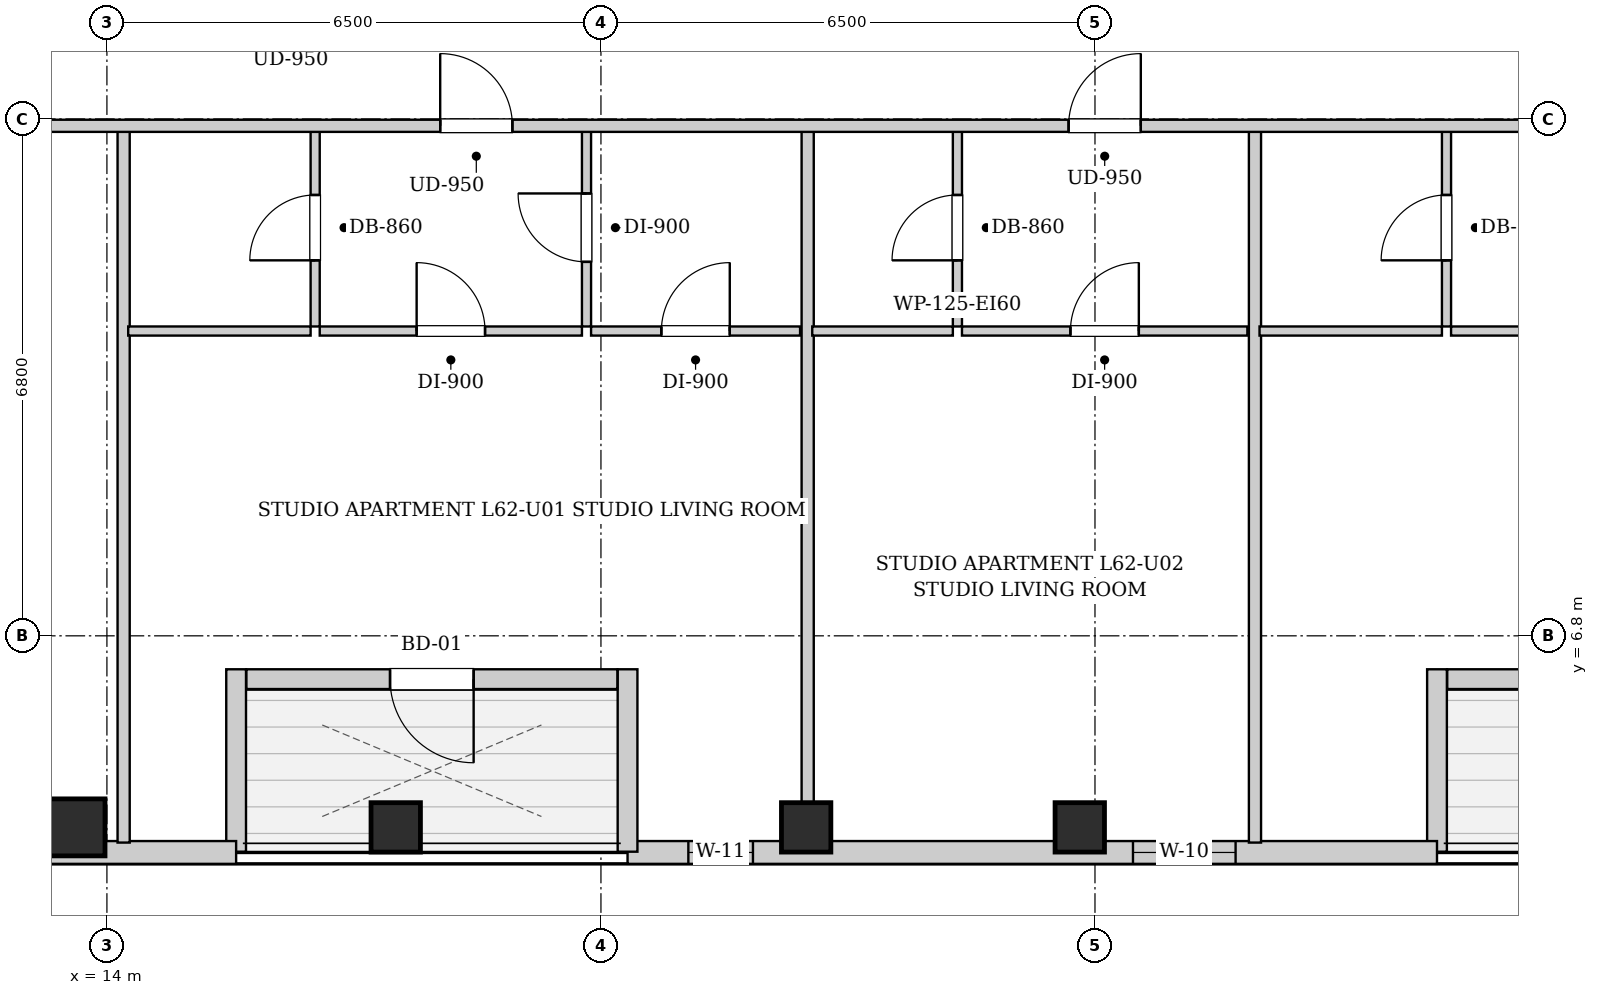
"""IFC4 building model, lengths in metres.
Left out: names, types, materials, properties, quantities, classifications, styles, units other than length and angle.
Written with IfcOpenShell. Run it as: python <this file> out.ifc"""

import sys

from ifc_helpers import new_model, si_unit, direction, frame, frame_2d, origin, origin_2d, place, context, subcontext, project, spatial, rectangle, extrude, element, fill, save


model = new_model("IFC4")
c1 = context("Model", 3, precision=1e-05, world=origin(), true_north=direction((0.0, 1.0)))
c2 = subcontext(c1, "Body", "Model", "MODEL_VIEW")
j1 = project(units=[si_unit("LENGTHUNIT", "METRE"), si_unit("PLANEANGLEUNIT", "RADIAN")], contexts=[c1])
p1 = place(None, origin())
s1 = spatial("IfcSite", under=j1, at=p1, CompositionType="ELEMENT")
p2 = place(p1, origin())
s2 = spatial("IfcBuilding", under=s1, at=p2, CompositionType="ELEMENT")
p3 = place(p2, frame((0.0, 0.0, 214.0)))
s3 = spatial("IfcBuildingStorey", under=s2, at=p3, CompositionType="ELEMENT", Elevation=214.0)
p4 = place(p3, frame((13.6, 4.28, 0.0), z_axis=(0.0, 0.0, 1.0), x_axis=(1.0, 0.0, 0.0)))
e1 = element("IfcColumn", 1, at=p4, inside=s3, PredefinedType="COLUMN", context=c2, shape_type="SweptSolid", body=[
    extrude(rectangle(XDim=0.75, YDim=0.75, at=origin_2d()), origin(), (0.0, 0.0, 1.0), 3.3),
])
for number, where, z_axis, x_axis in (
    (2, (17.8, 4.28, 0.0), (0.0, 0.0, 1.0), (1.0, 0.0, 0.0)),
    (3, (23.2, 4.28, 0.0), (0.0, 0.0, 1.0), (1.0, 0.0, 0.0)),
    (4, (26.8, 4.28, 0.0), (0.0, 0.0, 1.0), (1.0, 0.0, 0.0)),
):
    element("IfcColumn", number, at=place(p3, frame(where, z_axis=z_axis, x_axis=x_axis)), inside=s3, PredefinedType="COLUMN", context=c2, shape_type="SweptSolid", body=[
        extrude(rectangle(XDim=0.65, YDim=0.65, at=origin_2d()), origin(), (0.0, 0.0, 1.0), 3.3),
    ])
p5 = place(p3, frame((36.366, 6.23, 0.0), z_axis=(0.0, 0.0, 1.0), x_axis=(-1.0, 0.0, 0.0)))
e5 = element("IfcWall", 5, at=p5, inside=s3, PredefinedType="SOLIDWALL", context=c2, shape_type="SweptSolid", body=[
    extrude(rectangle(XDim=4.732, YDim=0.26, at=frame_2d((2.366, 0.0))), origin(), (0.0, 0.0, 1.0), 3.04),
])
p6 = place(p5, frame((1.816, 0.0, 0.0)))
e6 = element("IfcOpeningElement", 6, at=p6, cuts=e5, PredefinedType="OPENING", context=c2, shape_type="SweptSolid", body=[
    extrude(rectangle(XDim=1.1, YDim=2.0, at=frame_2d((0.55, 1.0))), frame((0.0, 0.14, 0.0), z_axis=(0.0, -1.0, 0.0), x_axis=(1.0, 0.0, 0.0)), (0.0, 0.0, 1.0), 0.28),
])
p7 = place(p3, frame((31.5, 6.36, 0.0), z_axis=(0.0, 0.0, 1.0), x_axis=(0.0, -1.0, 0.0)))
e7 = element("IfcWall", 7, at=p7, inside=s3, PredefinedType="SOLIDWALL", context=c2, shape_type="SweptSolid", body=[
    extrude(rectangle(XDim=2.4, YDim=0.26, at=frame_2d((1.2, 0.0))), origin(), (0.0, 0.0, 1.0), 3.04),
])
p8 = place(p3, frame((31.5, 3.95, 0.0), z_axis=(0.0, 0.0, 1.0), x_axis=(-1.0, 0.0, 0.0)))
e8 = element("IfcWall", 8, at=p8, inside=s3, PredefinedType="SOLIDWALL", context=c2, shape_type="SweptSolid", body=[
    extrude(rectangle(XDim=10.65, YDim=0.3, at=frame_2d((5.325, 0.0))), origin(), (0.0, 0.0, 1.0), 3.04),
])
p9 = place(p8, frame((9.0, 0.0, 0.55)))
e9 = element("IfcOpeningElement", 9, at=p9, cuts=e8, PredefinedType="OPENING", context=c2, shape_type="SweptSolid", body=[
    extrude(rectangle(XDim=0.85, YDim=1.2, at=frame_2d((0.425, 0.6))), frame((0.0, 0.16, 0.0), z_axis=(0.0, -1.0, 0.0), x_axis=(1.0, 0.0, 0.0)), (0.0, 0.0, 1.0), 0.32),
])
p10 = place(p8, frame((2.65, 0.0, 0.55)))
e10 = element("IfcOpeningElement", 10, at=p10, cuts=e8, PredefinedType="OPENING", context=c2, shape_type="SweptSolid", body=[
    extrude(rectangle(XDim=1.35, YDim=1.2, at=frame_2d((0.675, 0.6))), frame((0.0, 0.16, 0.0), z_axis=(0.0, -1.0, 0.0), x_axis=(1.0, 0.0, 0.0)), (0.0, 0.0, 1.0), 0.32),
])
p11 = place(p3, frame((20.85, 3.96, 0.0), z_axis=(0.0, 0.0, 1.0), x_axis=(0.0, 1.0, 0.0)))
e11 = element("IfcWall", 11, at=p11, inside=s3, PredefinedType="SOLIDWALL", context=c2, shape_type="SweptSolid", body=[
    extrude(rectangle(XDim=2.4, YDim=0.26, at=frame_2d((1.2, 0.0))), origin(), (0.0, 0.0, 1.0), 3.04),
])
p12 = place(p3, frame((20.716, 6.23, 0.0), z_axis=(0.0, 0.0, 1.0), x_axis=(-1.0, 0.0, 0.0)))
e12 = element("IfcWall", 12, at=p12, inside=s3, PredefinedType="SOLIDWALL", context=c2, shape_type="SweptSolid", body=[
    extrude(rectangle(XDim=4.882, YDim=0.26, at=frame_2d((2.441, 0.0))), origin(), (0.0, 0.0, 1.0), 3.04),
])
p13 = place(p12, frame((1.891, 0.0, 0.0)))
e13 = element("IfcOpeningElement", 13, at=p13, cuts=e12, PredefinedType="OPENING", context=c2, shape_type="SweptSolid", body=[
    extrude(rectangle(XDim=1.1, YDim=2.0, at=frame_2d((0.55, 1.0))), frame((0.0, 0.14, 0.0), z_axis=(0.0, -1.0, 0.0), x_axis=(1.0, 0.0, 0.0)), (0.0, 0.0, 1.0), 0.28),
])
p14 = place(p3, frame((15.7, 6.36, 0.0), z_axis=(0.0, 0.0, 1.0), x_axis=(0.0, -1.0, 0.0)))
e14 = element("IfcWall", 14, at=p14, inside=s3, PredefinedType="SOLIDWALL", context=c2, shape_type="SweptSolid", body=[
    extrude(rectangle(XDim=2.4, YDim=0.26, at=frame_2d((1.2, 0.0))), origin(), (0.0, 0.0, 1.0), 3.04),
])
p15 = place(p3, frame((15.7, 3.95, 0.0), z_axis=(0.0, 0.0, 1.0), x_axis=(-1.0, 0.0, 0.0)))
e15 = element("IfcWall", 15, at=p15, inside=s3, PredefinedType="SOLIDWALL", context=c2, shape_type="SweptSolid", body=[
    extrude(rectangle(XDim=2.6, YDim=0.3, at=frame_2d((1.3, 0.0))), origin(), (0.0, 0.0, 1.0), 3.04),
])
p16 = place(p3, frame((14.22, 4.08, 0.0), z_axis=(0.0, 0.0, 1.0), x_axis=(0.0, 1.0, 0.0)))
e16 = element("IfcWall", 16, at=p16, inside=s3, PredefinedType="PARTITIONING", context=c2, shape_type="SweptSolid", body=[
    extrude(rectangle(XDim=9.39, YDim=0.16, at=frame_2d((4.695, 0.0))), origin(), (0.0, 0.0, 1.0), 3.04),
])
p17 = place(p3, frame((16.74, 10.87, 0.0), z_axis=(0.0, 0.0, 1.0), x_axis=(0.0, 1.0, 0.0)))
e17 = element("IfcWall", 17, at=p17, inside=s3, PredefinedType="PARTITIONING", context=c2, shape_type="SweptSolid", body=[
    extrude(rectangle(XDim=2.6, YDim=0.12, at=frame_2d((1.3, 0.0))), origin(), (0.0, 0.0, 1.0), 3.04),
])
p18 = place(p17, frame((0.87, 0.0, 0.0)))
e18 = element("IfcOpeningElement", 18, at=p18, cuts=e17, PredefinedType="OPENING", context=c2, shape_type="SweptSolid", body=[
    extrude(rectangle(XDim=0.86, YDim=2.05, at=frame_2d((0.43, 1.025))), frame((0.0, 0.07, 0.0), z_axis=(0.0, -1.0, 0.0), x_axis=(1.0, 0.0, 0.0)), (0.0, 0.0, 1.0), 0.14),
])
p19 = place(p3, frame((14.28, 10.81, 0.0), z_axis=(0.0, 0.0, 1.0), x_axis=(1.0, 0.0, 0.0)))
e19 = element("IfcWall", 19, at=p19, inside=s3, PredefinedType="PARTITIONING", context=c2, shape_type="SweptSolid", body=[
    extrude(rectangle(XDim=2.4, YDim=0.12, at=frame_2d((1.2, 0.0))), origin(), (0.0, 0.0, 1.0), 3.04),
])
p20 = place(p3, frame((20.31, 10.87, 0.0), z_axis=(0.0, 0.0, 1.0), x_axis=(0.0, 1.0, 0.0)))
e20 = element("IfcWall", 20, at=p20, inside=s3, PredefinedType="PARTITIONING", context=c2, shape_type="SweptSolid", body=[
    extrude(rectangle(XDim=2.6, YDim=0.12, at=frame_2d((1.3, 0.0))), origin(), (0.0, 0.0, 1.0), 3.04),
])
p21 = place(p20, frame((0.85, 0.0, 0.0)))
e21 = element("IfcOpeningElement", 21, at=p21, cuts=e20, PredefinedType="OPENING", context=c2, shape_type="SweptSolid", body=[
    extrude(rectangle(XDim=0.9, YDim=2.05, at=frame_2d((0.45, 1.025))), frame((0.0, 0.07, 0.0), z_axis=(0.0, -1.0, 0.0), x_axis=(1.0, 0.0, 0.0)), (0.0, 0.0, 1.0), 0.14),
])
p22 = place(p3, frame((16.8, 10.81, 0.0), z_axis=(0.0, 0.0, 1.0), x_axis=(1.0, 0.0, 0.0)))
e22 = element("IfcWall", 22, at=p22, inside=s3, PredefinedType="PARTITIONING", context=c2, shape_type="SweptSolid", body=[
    extrude(rectangle(XDim=3.45, YDim=0.12, at=frame_2d((1.725, 0.0))), origin(), (0.0, 0.0, 1.0), 3.04),
])
p23 = place(p22, frame((1.275, 0.0, 0.0)))
e23 = element("IfcOpeningElement", 23, at=p23, cuts=e22, PredefinedType="OPENING", context=c2, shape_type="SweptSolid", body=[
    extrude(rectangle(XDim=0.9, YDim=2.05, at=frame_2d((0.45, 1.025))), frame((0.0, 0.07, 0.0), z_axis=(0.0, -1.0, 0.0), x_axis=(1.0, 0.0, 0.0)), (0.0, 0.0, 1.0), 0.14),
])
p24 = place(p3, frame((20.37, 10.81, 0.0), z_axis=(0.0, 0.0, 1.0), x_axis=(1.0, 0.0, 0.0)))
e24 = element("IfcWall", 24, at=p24, inside=s3, PredefinedType="PARTITIONING", context=c2, shape_type="SweptSolid", body=[
    extrude(rectangle(XDim=2.75, YDim=0.12, at=frame_2d((1.375, 0.0))), origin(), (0.0, 0.0, 1.0), 3.04),
])
p25 = place(p24, frame((0.925, 0.0, 0.0)))
e25 = element("IfcOpeningElement", 25, at=p25, cuts=e24, PredefinedType="OPENING", context=c2, shape_type="SweptSolid", body=[
    extrude(rectangle(XDim=0.9, YDim=2.05, at=frame_2d((0.45, 1.025))), frame((0.0, 0.07, 0.0), z_axis=(0.0, -1.0, 0.0), x_axis=(1.0, 0.0, 0.0)), (0.0, 0.0, 1.0), 0.14),
])
p26 = place(p3, frame((23.22, 4.08, 0.0), z_axis=(0.0, 0.0, 1.0), x_axis=(0.0, 1.0, 0.0)))
e26 = element("IfcWall", 26, at=p26, inside=s3, PredefinedType="PARTITIONING", context=c2, shape_type="SweptSolid", body=[
    extrude(rectangle(XDim=9.39, YDim=0.16, at=frame_2d((4.695, 0.0))), origin(), (0.0, 0.0, 1.0), 3.04),
])
p27 = place(p3, frame((25.19, 10.87, 0.0), z_axis=(0.0, 0.0, 1.0), x_axis=(0.0, 1.0, 0.0)))
e27 = element("IfcWall", 27, at=p27, inside=s3, PredefinedType="PARTITIONING", context=c2, shape_type="SweptSolid", body=[
    extrude(rectangle(XDim=2.6, YDim=0.12, at=frame_2d((1.3, 0.0))), origin(), (0.0, 0.0, 1.0), 3.04),
])
p28 = place(p27, frame((0.87, 0.0, 0.0)))
e28 = element("IfcOpeningElement", 28, at=p28, cuts=e27, PredefinedType="OPENING", context=c2, shape_type="SweptSolid", body=[
    extrude(rectangle(XDim=0.86, YDim=2.05, at=frame_2d((0.43, 1.025))), frame((0.0, 0.07, 0.0), z_axis=(0.0, -1.0, 0.0), x_axis=(1.0, 0.0, 0.0)), (0.0, 0.0, 1.0), 0.14),
])
p29 = place(p3, frame((23.28, 10.81, 0.0), z_axis=(0.0, 0.0, 1.0), x_axis=(1.0, 0.0, 0.0)))
e29 = element("IfcWall", 29, at=p29, inside=s3, PredefinedType="PARTITIONING", context=c2, shape_type="SweptSolid", body=[
    extrude(rectangle(XDim=1.85, YDim=0.12, at=frame_2d((0.925, 0.0))), origin(), (0.0, 0.0, 1.0), 3.04),
])
p30 = place(p3, frame((25.25, 10.81, 0.0), z_axis=(0.0, 0.0, 1.0), x_axis=(1.0, 0.0, 0.0)))
e30 = element("IfcWall", 30, at=p30, inside=s3, PredefinedType="PARTITIONING", context=c2, shape_type="SweptSolid", body=[
    extrude(rectangle(XDim=3.755, YDim=0.12, at=frame_2d((1.877, 0.0))), origin(), (0.0, 0.0, 1.0), 3.04),
])
p31 = place(p30, frame((1.427, 0.0, 0.0)))
e31 = element("IfcOpeningElement", 31, at=p31, cuts=e30, PredefinedType="OPENING", context=c2, shape_type="SweptSolid", body=[
    extrude(rectangle(XDim=0.9, YDim=2.05, at=frame_2d((0.45, 1.025))), frame((0.0, 0.07, 0.0), z_axis=(0.0, -1.0, 0.0), x_axis=(1.0, 0.0, 0.0)), (0.0, 0.0, 1.0), 0.14),
])
p32 = place(p3, frame((29.105, 4.08, 0.0), z_axis=(0.0, 0.0, 1.0), x_axis=(0.0, 1.0, 0.0)))
e32 = element("IfcWall", 32, at=p32, inside=s3, PredefinedType="PARTITIONING", context=c2, shape_type="SweptSolid", body=[
    extrude(rectangle(XDim=9.39, YDim=0.16, at=frame_2d((4.695, 0.0))), origin(), (0.0, 0.0, 1.0), 3.04),
])
p33 = place(p3, frame((31.625, 10.87, 0.0), z_axis=(0.0, 0.0, 1.0), x_axis=(0.0, 1.0, 0.0)))
e33 = element("IfcWall", 33, at=p33, inside=s3, PredefinedType="PARTITIONING", context=c2, shape_type="SweptSolid", body=[
    extrude(rectangle(XDim=2.6, YDim=0.12, at=frame_2d((1.3, 0.0))), origin(), (0.0, 0.0, 1.0), 3.04),
])
p34 = place(p33, frame((0.87, 0.0, 0.0)))
e34 = element("IfcOpeningElement", 34, at=p34, cuts=e33, PredefinedType="OPENING", context=c2, shape_type="SweptSolid", body=[
    extrude(rectangle(XDim=0.86, YDim=2.05, at=frame_2d((0.43, 1.025))), frame((0.0, 0.07, 0.0), z_axis=(0.0, -1.0, 0.0), x_axis=(1.0, 0.0, 0.0)), (0.0, 0.0, 1.0), 0.14),
])
p35 = place(p3, frame((29.165, 10.81, 0.0), z_axis=(0.0, 0.0, 1.0), x_axis=(1.0, 0.0, 0.0)))
e35 = element("IfcWall", 35, at=p35, inside=s3, PredefinedType="PARTITIONING", context=c2, shape_type="SweptSolid", body=[
    extrude(rectangle(XDim=2.4, YDim=0.12, at=frame_2d((1.2, 0.0))), origin(), (0.0, 0.0, 1.0), 3.04),
])
p36 = place(p3, frame((31.685, 10.81, 0.0), z_axis=(0.0, 0.0, 1.0), x_axis=(1.0, 0.0, 0.0)))
e36 = element("IfcWall", 36, at=p36, inside=s3, PredefinedType="PARTITIONING", context=c2, shape_type="SweptSolid", body=[
    extrude(rectangle(XDim=3.45, YDim=0.12, at=frame_2d((1.725, 0.0))), origin(), (0.0, 0.0, 1.0), 3.04),
])
p37 = place(p36, frame((1.275, 0.0, 0.0)))
e37 = element("IfcOpeningElement", 37, at=p37, cuts=e36, PredefinedType="OPENING", context=c2, shape_type="SweptSolid", body=[
    extrude(rectangle(XDim=0.9, YDim=2.05, at=frame_2d((0.45, 1.025))), frame((0.0, 0.07, 0.0), z_axis=(0.0, -1.0, 0.0), x_axis=(1.0, 0.0, 0.0)), (0.0, 0.0, 1.0), 0.14),
])
p38 = place(p3, frame((13.15, 13.51, 0.0), z_axis=(0.0, 0.0, 1.0), x_axis=(1.0, 0.0, 0.0)))
e38 = element("IfcWall", 38, at=p38, inside=s3, PredefinedType="PARTITIONING", context=c2, shape_type="SweptSolid", body=[
    extrude(rectangle(XDim=24.6, YDim=0.16, at=frame_2d((12.3, 0.0))), origin(), (0.0, 0.0, 1.0), 3.04),
])
p39 = place(p38, frame((5.235, 0.0, 0.0)))
e39 = element("IfcOpeningElement", 39, at=p39, cuts=e38, PredefinedType="OPENING", context=c2, shape_type="SweptSolid", body=[
    extrude(rectangle(XDim=0.95, YDim=2.1, at=frame_2d((0.475, 1.05))), frame((0.0, 0.09, 0.0), z_axis=(0.0, -1.0, 0.0), x_axis=(1.0, 0.0, 0.0)), (0.0, 0.0, 1.0), 0.18),
])
p40 = place(p38, frame((13.503, 0.0, 0.0)))
e40 = element("IfcOpeningElement", 40, at=p40, cuts=e38, PredefinedType="OPENING", context=c2, shape_type="SweptSolid", body=[
    extrude(rectangle(XDim=0.95, YDim=2.1, at=frame_2d((0.475, 1.05))), frame((0.0, 0.09, 0.0), z_axis=(0.0, -1.0, 0.0), x_axis=(1.0, 0.0, 0.0)), (0.0, 0.0, 1.0), 0.18),
])
p41 = place(p38, frame((20.635, 0.0, 0.0)))
e41 = element("IfcOpeningElement", 41, at=p41, cuts=e38, PredefinedType="OPENING", context=c2, shape_type="SweptSolid", body=[
    extrude(rectangle(XDim=0.95, YDim=2.1, at=frame_2d((0.475, 1.05))), frame((0.0, 0.09, 0.0), z_axis=(0.0, -1.0, 0.0), x_axis=(1.0, 0.0, 0.0)), (0.0, 0.0, 1.0), 0.18),
])
p42 = place(p18, origin())
e42 = element("IfcDoor", 42, at=p42, inside=s3, OperationType="SINGLE_SWING_LEFT", PredefinedType="DOOR", context=c2, shape_type="SweptSolid", body=[
    extrude(rectangle(XDim=0.86, YDim=2.05, at=frame_2d((0.43, 1.025))), frame((0.0, 0.025, 0.0), z_axis=(0.0, -1.0, 0.0), x_axis=(1.0, 0.0, 0.0)), (0.0, 0.0, 1.0), 0.05),
])
fill(e18, e42)
p43 = place(p21, origin())
e43 = element("IfcDoor", 43, at=p43, inside=s3, OperationType="SINGLE_SWING_RIGHT", PredefinedType="DOOR", context=c2, shape_type="SweptSolid", body=[
    extrude(rectangle(XDim=0.9, YDim=2.05, at=frame_2d((0.45, 1.025))), frame((0.0, 0.025, 0.0), z_axis=(0.0, -1.0, 0.0), x_axis=(1.0, 0.0, 0.0)), (0.0, 0.0, 1.0), 0.05),
])
fill(e21, e43)
p44 = place(p23, origin())
e44 = element("IfcDoor", 44, at=p44, inside=s3, OperationType="SINGLE_SWING_LEFT", PredefinedType="DOOR", context=c2, shape_type="SweptSolid", body=[
    extrude(rectangle(XDim=0.9, YDim=2.05, at=frame_2d((0.45, 1.025))), frame((0.0, 0.025, 0.0), z_axis=(0.0, -1.0, 0.0), x_axis=(1.0, 0.0, 0.0)), (0.0, 0.0, 1.0), 0.05),
])
fill(e23, e44)
p45 = place(p25, origin())
e45 = element("IfcDoor", 45, at=p45, inside=s3, OperationType="SINGLE_SWING_RIGHT", PredefinedType="DOOR", context=c2, shape_type="SweptSolid", body=[
    extrude(rectangle(XDim=0.9, YDim=2.05, at=frame_2d((0.45, 1.025))), frame((0.0, 0.025, 0.0), z_axis=(0.0, -1.0, 0.0), x_axis=(1.0, 0.0, 0.0)), (0.0, 0.0, 1.0), 0.05),
])
fill(e25, e45)
p46 = place(p28, origin())
e46 = element("IfcDoor", 46, at=p46, inside=s3, OperationType="SINGLE_SWING_LEFT", PredefinedType="DOOR", context=c2, shape_type="SweptSolid", body=[
    extrude(rectangle(XDim=0.86, YDim=2.05, at=frame_2d((0.43, 1.025))), frame((0.0, 0.025, 0.0), z_axis=(0.0, -1.0, 0.0), x_axis=(1.0, 0.0, 0.0)), (0.0, 0.0, 1.0), 0.05),
])
fill(e28, e46)
p47 = place(p31, origin())
e47 = element("IfcDoor", 47, at=p47, inside=s3, OperationType="SINGLE_SWING_RIGHT", PredefinedType="DOOR", context=c2, shape_type="SweptSolid", body=[
    extrude(rectangle(XDim=0.9, YDim=2.05, at=frame_2d((0.45, 1.025))), frame((0.0, 0.025, 0.0), z_axis=(0.0, -1.0, 0.0), x_axis=(1.0, 0.0, 0.0)), (0.0, 0.0, 1.0), 0.05),
])
fill(e31, e47)
p48 = place(p34, origin())
e48 = element("IfcDoor", 48, at=p48, inside=s3, OperationType="SINGLE_SWING_LEFT", PredefinedType="DOOR", context=c2, shape_type="SweptSolid", body=[
    extrude(rectangle(XDim=0.86, YDim=2.05, at=frame_2d((0.43, 1.025))), frame((0.0, 0.025, 0.0), z_axis=(0.0, -1.0, 0.0), x_axis=(1.0, 0.0, 0.0)), (0.0, 0.0, 1.0), 0.05),
])
fill(e34, e48)
p49 = place(p39, origin())
e49 = element("IfcDoor", 49, at=p49, inside=s3, OperationType="SINGLE_SWING_LEFT", PredefinedType="DOOR", context=c2, shape_type="SweptSolid", body=[
    extrude(rectangle(XDim=0.95, YDim=2.1, at=frame_2d((0.475, 1.05))), frame((0.0, 0.025, 0.0), z_axis=(0.0, -1.0, 0.0), x_axis=(1.0, 0.0, 0.0)), (0.0, 0.0, 1.0), 0.05),
])
fill(e39, e49)
p50 = place(p40, origin())
e50 = element("IfcDoor", 50, at=p50, inside=s3, OperationType="SINGLE_SWING_RIGHT", PredefinedType="DOOR", context=c2, shape_type="SweptSolid", body=[
    extrude(rectangle(XDim=0.95, YDim=2.1, at=frame_2d((0.475, 1.05))), frame((0.0, 0.025, 0.0), z_axis=(0.0, -1.0, 0.0), x_axis=(1.0, 0.0, 0.0)), (0.0, 0.0, 1.0), 0.05),
])
fill(e40, e50)
p51 = place(p13, origin())
e51 = element("IfcDoor", 51, at=p51, inside=s3, OperationType="SINGLE_SWING_LEFT", PredefinedType="DOOR", context=c2, shape_type="SweptSolid", body=[
    extrude(rectangle(XDim=1.1, YDim=2.0, at=frame_2d((0.55, 1.0))), frame((0.0, 0.025, 0.0), z_axis=(0.0, -1.0, 0.0), x_axis=(1.0, 0.0, 0.0)), (0.0, 0.0, 1.0), 0.05),
])
fill(e13, e51)
p52 = place(p9, origin())
e52 = element("IfcWindow", 52, at=p52, inside=s3, PartitioningType="SINGLE_PANEL", PredefinedType="WINDOW", context=c2, shape_type="SweptSolid", body=[
    extrude(rectangle(XDim=0.85, YDim=1.2, at=frame_2d((0.425, 0.6))), frame((0.0, 0.03, 0.0), z_axis=(0.0, -1.0, 0.0), x_axis=(1.0, 0.0, 0.0)), (0.0, 0.0, 1.0), 0.06),
])
fill(e9, e52)
p53 = place(p10, origin())
e53 = element("IfcWindow", 53, at=p53, inside=s3, PartitioningType="SINGLE_PANEL", PredefinedType="WINDOW", context=c2, shape_type="SweptSolid", body=[
    extrude(rectangle(XDim=1.35, YDim=1.2, at=frame_2d((0.675, 0.6))), frame((0.0, 0.03, 0.0), z_axis=(0.0, -1.0, 0.0), x_axis=(1.0, 0.0, 0.0)), (0.0, 0.0, 1.0), 0.06),
])
fill(e10, e53)
save(model, sys.argv[1])
